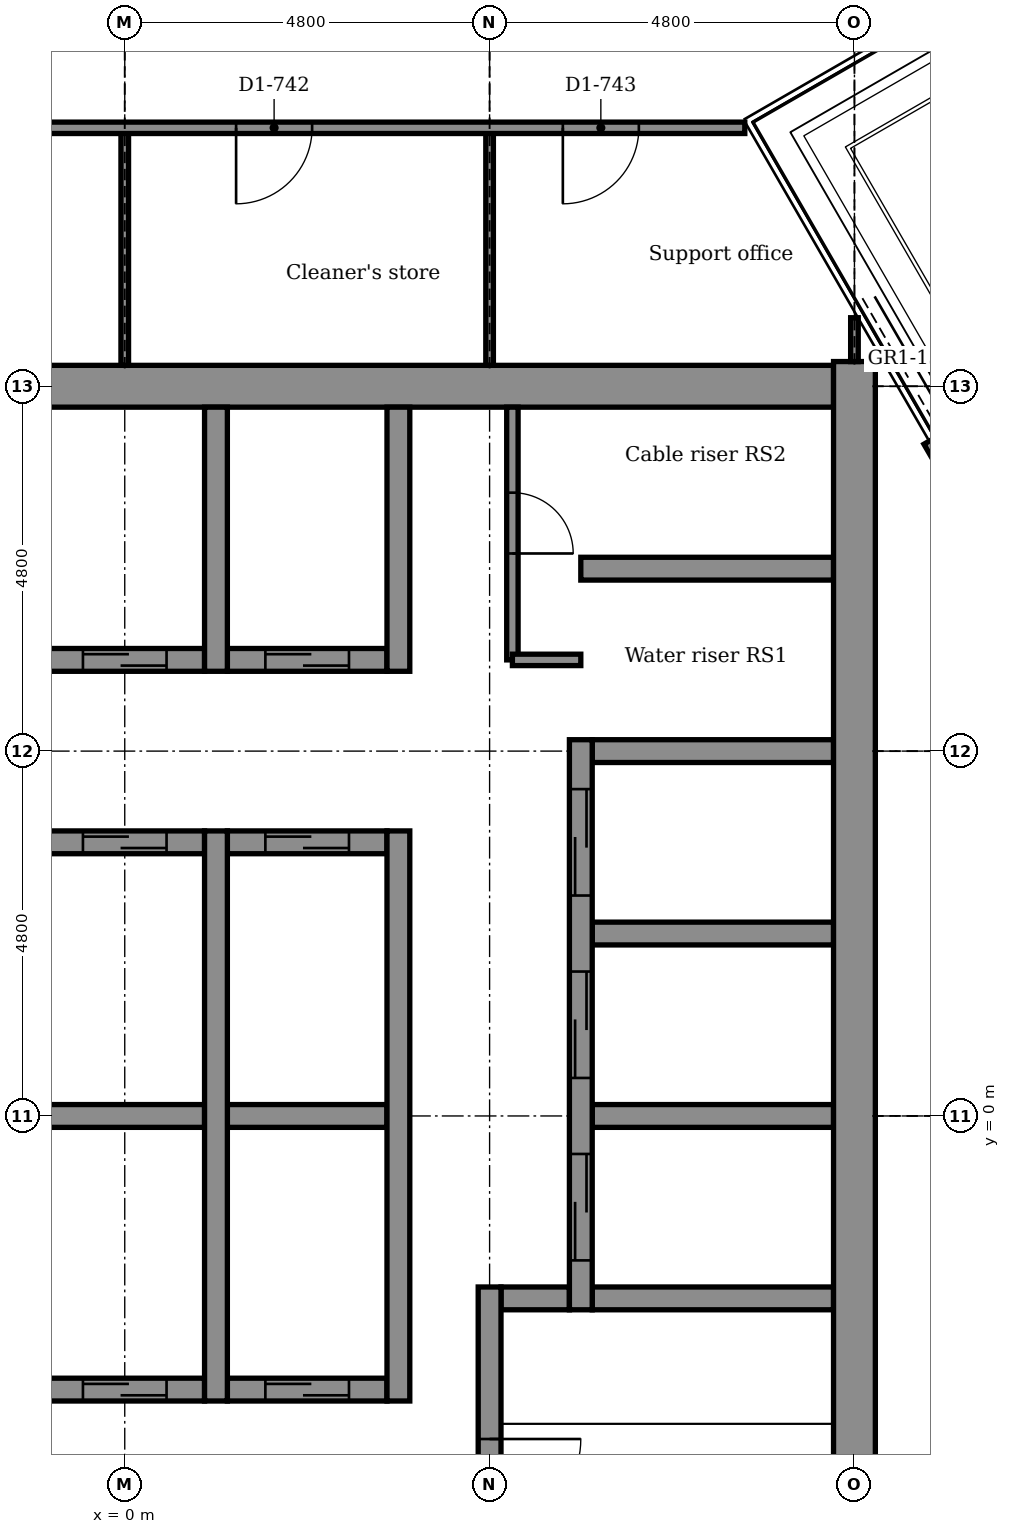
"""IFC4 building model, lengths in metres.
Left out: names, types, materials, properties, quantities, classifications, styles, units other than length and angle.
Written with IfcOpenShell. Run it as: python <this file> out.ifc"""

import sys

from ifc_helpers import new_model, si_unit, direction, frame, frame_2d, origin, place, context, subcontext, project, spatial, rectangle, extrude, element, fill, save


model = new_model("IFC4")
c1 = context("Model", 3, precision=1e-05, world=origin(), true_north=direction((0.0, 1.0)))
c2 = subcontext(c1, "Body", "Model", "MODEL_VIEW")
j1 = project(units=[si_unit("LENGTHUNIT", "METRE"), si_unit("PLANEANGLEUNIT", "RADIAN")], contexts=[c1])
p1 = place(None, origin())
s1 = spatial("IfcSite", under=j1, at=p1, CompositionType="ELEMENT")
p2 = place(p1, origin())
s2 = spatial("IfcBuilding", under=s1, at=p2, CompositionType="ELEMENT")
p3 = place(p2, frame((0.0, 0.0, 285.2)))
s3 = spatial("IfcBuildingStorey", under=s2, at=p3, CompositionType="ELEMENT", Elevation=285.2)
p4 = place(p3, frame((-1.05, -3.6, -0.15), z_axis=(0.0, 0.0, 1.0), x_axis=(1.0, 0.0, 0.0)))
e1 = element("IfcWall", 1, at=p4, inside=s3, PredefinedType="STANDARD", context=c2, shape_type="SweptSolid", body=[
    extrude(rectangle(XDim=2.1, YDim=0.3, at=frame_2d((1.05, 0.0))), origin(), (0.0, 0.0, 1.0), 3.9),
])
p5 = place(p4, frame((0.5, 0.0, 0.15)))
e2 = element("IfcOpeningElement", 2, at=p5, cuts=e1, PredefinedType="OPENING", context=c2, shape_type="SweptSolid", body=[
    extrude(rectangle(XDim=1.1, YDim=2.1, at=frame_2d((0.55, 1.05))), frame((0.0, 0.16, 0.0), z_axis=(0.0, -1.0, 0.0), x_axis=(1.0, 0.0, 0.0)), (0.0, 0.0, 1.0), 0.32),
])
p6 = place(p3, frame((1.35, -3.6, -0.15), z_axis=(0.0, 0.0, 1.0), x_axis=(1.0, 0.0, 0.0)))
e3 = element("IfcWall", 3, at=p6, inside=s3, PredefinedType="STANDARD", context=c2, shape_type="SweptSolid", body=[
    extrude(rectangle(XDim=2.1, YDim=0.3, at=frame_2d((1.05, 0.0))), origin(), (0.0, 0.0, 1.0), 3.9),
])
p7 = place(p6, frame((0.5, 0.0, 0.15)))
e4 = element("IfcOpeningElement", 4, at=p7, cuts=e3, PredefinedType="OPENING", context=c2, shape_type="SweptSolid", body=[
    extrude(rectangle(XDim=1.1, YDim=2.1, at=frame_2d((0.55, 1.05))), frame((0.0, 0.16, 0.0), z_axis=(0.0, -1.0, 0.0), x_axis=(1.0, 0.0, 0.0)), (0.0, 0.0, 1.0), 0.32),
])
p8 = place(p3, frame((4.95, -2.4, -0.15), z_axis=(0.0, 0.0, 1.0), x_axis=(1.0, 0.0, 0.0)))
e5 = element("IfcWall", 5, at=p8, inside=s3, PredefinedType="STANDARD", context=c2, shape_type="SweptSolid", body=[
    extrude(rectangle(XDim=0.9, YDim=0.3, at=frame_2d((0.45, 0.0))), origin(), (0.0, 0.0, 1.0), 3.9),
])
p9 = place(p3, frame((6.15, -2.4, -0.15), z_axis=(0.0, 0.0, 1.0), x_axis=(1.0, 0.0, 0.0)))
e6 = element("IfcWall", 6, at=p9, inside=s3, PredefinedType="STANDARD", context=c2, shape_type="SweptSolid", body=[
    extrude(rectangle(XDim=3.175, YDim=0.3, at=frame_2d((1.587, 0.0))), origin(), (0.0, 0.0, 1.0), 3.9),
])
p10 = place(p3, frame((-1.05, 0.0, -0.15), z_axis=(0.0, 0.0, 1.0), x_axis=(1.0, 0.0, 0.0)))
e7 = element("IfcWall", 7, at=p10, inside=s3, PredefinedType="STANDARD", context=c2, shape_type="SweptSolid", body=[
    extrude(rectangle(XDim=2.1, YDim=0.3, at=frame_2d((1.05, 0.0))), origin(), (0.0, 0.0, 1.0), 3.9),
])
p11 = place(p3, frame((1.35, 0.0, -0.15), z_axis=(0.0, 0.0, 1.0), x_axis=(1.0, 0.0, 0.0)))
e8 = element("IfcWall", 8, at=p11, inside=s3, PredefinedType="STANDARD", context=c2, shape_type="SweptSolid", body=[
    extrude(rectangle(XDim=2.1, YDim=0.3, at=frame_2d((1.05, 0.0))), origin(), (0.0, 0.0, 1.0), 3.9),
])
for number, where, z_axis, x_axis in (
    (9, (6.15, 0.0, -0.15), (0.0, 0.0, 1.0), (1.0, 0.0, 0.0)),
    (10, (6.15, 2.4, -0.15), (0.0, 0.0, 1.0), (1.0, 0.0, 0.0)),
):
    element("IfcWall", number, at=place(p3, frame(where, z_axis=z_axis, x_axis=x_axis)), inside=s3, PredefinedType="STANDARD", context=c2, shape_type="SweptSolid", body=[
        extrude(rectangle(XDim=3.175, YDim=0.3, at=frame_2d((1.587, 0.0))), origin(), (0.0, 0.0, 1.0), 3.9),
    ])
p12 = place(p3, frame((-1.05, 3.6, -0.15), z_axis=(0.0, 0.0, 1.0), x_axis=(1.0, 0.0, 0.0)))
e11 = element("IfcWall", 11, at=p12, inside=s3, PredefinedType="STANDARD", context=c2, shape_type="SweptSolid", body=[
    extrude(rectangle(XDim=2.1, YDim=0.3, at=frame_2d((1.05, 0.0))), origin(), (0.0, 0.0, 1.0), 3.9),
])
p13 = place(p12, frame((0.5, 0.0, 0.15)))
e12 = element("IfcOpeningElement", 12, at=p13, cuts=e11, PredefinedType="OPENING", context=c2, shape_type="SweptSolid", body=[
    extrude(rectangle(XDim=1.1, YDim=2.1, at=frame_2d((0.55, 1.05))), frame((0.0, 0.16, 0.0), z_axis=(0.0, -1.0, 0.0), x_axis=(1.0, 0.0, 0.0)), (0.0, 0.0, 1.0), 0.32),
])
p14 = place(p3, frame((1.35, 3.6, -0.15), z_axis=(0.0, 0.0, 1.0), x_axis=(1.0, 0.0, 0.0)))
e13 = element("IfcWall", 13, at=p14, inside=s3, PredefinedType="STANDARD", context=c2, shape_type="SweptSolid", body=[
    extrude(rectangle(XDim=2.1, YDim=0.3, at=frame_2d((1.05, 0.0))), origin(), (0.0, 0.0, 1.0), 3.9),
])
p15 = place(p14, frame((0.5, 0.0, 0.15)))
e14 = element("IfcOpeningElement", 14, at=p15, cuts=e13, PredefinedType="OPENING", context=c2, shape_type="SweptSolid", body=[
    extrude(rectangle(XDim=1.1, YDim=2.1, at=frame_2d((0.55, 1.05))), frame((0.0, 0.16, 0.0), z_axis=(0.0, -1.0, 0.0), x_axis=(1.0, 0.0, 0.0)), (0.0, 0.0, 1.0), 0.32),
])
p16 = place(p3, frame((6.15, 4.8, -0.15), z_axis=(0.0, 0.0, 1.0), x_axis=(1.0, 0.0, 0.0)))
e15 = element("IfcWall", 15, at=p16, inside=s3, PredefinedType="STANDARD", context=c2, shape_type="SweptSolid", body=[
    extrude(rectangle(XDim=3.175, YDim=0.3, at=frame_2d((1.587, 0.0))), origin(), (0.0, 0.0, 1.0), 3.9),
])
p17 = place(p3, frame((-1.05, 6.0, -0.15), z_axis=(0.0, 0.0, 1.0), x_axis=(1.0, 0.0, 0.0)))
e16 = element("IfcWall", 16, at=p17, inside=s3, PredefinedType="STANDARD", context=c2, shape_type="SweptSolid", body=[
    extrude(rectangle(XDim=2.1, YDim=0.3, at=frame_2d((1.05, 0.0))), origin(), (0.0, 0.0, 1.0), 3.9),
])
p18 = place(p17, frame((0.5, 0.0, 0.15)))
e17 = element("IfcOpeningElement", 17, at=p18, cuts=e16, PredefinedType="OPENING", context=c2, shape_type="SweptSolid", body=[
    extrude(rectangle(XDim=1.1, YDim=2.1, at=frame_2d((0.55, 1.05))), frame((0.0, 0.16, 0.0), z_axis=(0.0, -1.0, 0.0), x_axis=(1.0, 0.0, 0.0)), (0.0, 0.0, 1.0), 0.32),
])
p19 = place(p3, frame((1.35, 6.0, -0.15), z_axis=(0.0, 0.0, 1.0), x_axis=(1.0, 0.0, 0.0)))
e18 = element("IfcWall", 18, at=p19, inside=s3, PredefinedType="STANDARD", context=c2, shape_type="SweptSolid", body=[
    extrude(rectangle(XDim=2.1, YDim=0.3, at=frame_2d((1.05, 0.0))), origin(), (0.0, 0.0, 1.0), 3.9),
])
p20 = place(p19, frame((0.5, 0.0, 0.15)))
e19 = element("IfcOpeningElement", 19, at=p20, cuts=e18, PredefinedType="OPENING", context=c2, shape_type="SweptSolid", body=[
    extrude(rectangle(XDim=1.1, YDim=2.1, at=frame_2d((0.55, 1.05))), frame((0.0, 0.16, 0.0), z_axis=(0.0, -1.0, 0.0), x_axis=(1.0, 0.0, 0.0)), (0.0, 0.0, 1.0), 0.32),
])
p21 = place(p3, frame((6.0, 7.2, -0.15), z_axis=(0.0, 0.0, 1.0), x_axis=(1.0, 0.0, 0.0)))
e20 = element("IfcWall", 20, at=p21, inside=s3, PredefinedType="STANDARD", context=c2, shape_type="SweptSolid", body=[
    extrude(rectangle(XDim=3.325, YDim=0.3, at=frame_2d((1.663, 0.0))), origin(), (0.0, 0.0, 1.0), 3.9),
])
p22 = place(p3, frame((-5.25, 9.6, -0.15), z_axis=(0.0, 0.0, 1.0), x_axis=(1.0, 0.0, 0.0)))
e21 = element("IfcWall", 21, at=p22, inside=s3, PredefinedType="SHEAR", context=c2, shape_type="SweptSolid", body=[
    extrude(rectangle(XDim=14.575, YDim=0.55, at=frame_2d((7.288, 0.0))), origin(), (0.0, 0.0, 1.0), 3.9),
])
p23 = place(p22, frame((0.6, 0.0, 0.15)))
e22 = element("IfcOpeningElement", 22, at=p23, cuts=e21, PredefinedType="OPENING", context=c2, shape_type="SweptSolid", body=[
    extrude(rectangle(XDim=0.9, YDim=2.1, at=frame_2d((0.45, 1.05))), frame((0.0, 0.285, 0.0), z_axis=(0.0, -1.0, 0.0), x_axis=(1.0, 0.0, 0.0)), (0.0, 0.0, 1.0), 0.57),
])
p24 = place(p3, frame((1.2, -3.75, -0.15), z_axis=(0.0, 0.0, 1.0), x_axis=(0.0, 1.0, 0.0)))
e23 = element("IfcWall", 23, at=p24, inside=s3, PredefinedType="STANDARD", context=c2, shape_type="SweptSolid", body=[
    extrude(rectangle(XDim=7.5, YDim=0.3, at=frame_2d((3.75, 0.0))), origin(), (0.0, 0.0, 1.0), 3.9),
])
p25 = place(p3, frame((1.2, 5.85, -0.15), z_axis=(0.0, 0.0, 1.0), x_axis=(0.0, 1.0, 0.0)))
e24 = element("IfcWall", 24, at=p25, inside=s3, PredefinedType="STANDARD", context=c2, shape_type="SweptSolid", body=[
    extrude(rectangle(XDim=3.475, YDim=0.3, at=frame_2d((1.737, 0.0))), origin(), (0.0, 0.0, 1.0), 3.9),
])
p26 = place(p3, frame((3.6, -3.75, -0.15), z_axis=(0.0, 0.0, 1.0), x_axis=(0.0, 1.0, 0.0)))
e25 = element("IfcWall", 25, at=p26, inside=s3, PredefinedType="STANDARD", context=c2, shape_type="SweptSolid", body=[
    extrude(rectangle(XDim=7.5, YDim=0.3, at=frame_2d((3.75, 0.0))), origin(), (0.0, 0.0, 1.0), 3.9),
])
p27 = place(p3, frame((3.6, 5.85, -0.15), z_axis=(0.0, 0.0, 1.0), x_axis=(0.0, 1.0, 0.0)))
e26 = element("IfcWall", 26, at=p27, inside=s3, PredefinedType="STANDARD", context=c2, shape_type="SweptSolid", body=[
    extrude(rectangle(XDim=3.475, YDim=0.3, at=frame_2d((1.737, 0.0))), origin(), (0.0, 0.0, 1.0), 3.9),
])
p28 = place(p3, frame((4.8, -9.325, -0.15), z_axis=(0.0, 0.0, 1.0), x_axis=(0.0, 1.0, 0.0)))
e27 = element("IfcWall", 27, at=p28, inside=s3, PredefinedType="STANDARD", context=c2, shape_type="SweptSolid", body=[
    extrude(rectangle(XDim=7.075, YDim=0.3, at=frame_2d((3.538, 0.0))), origin(), (0.0, 0.0, 1.0), 3.9),
])
p29 = place(p28, frame((3.875, 0.0, 0.15)))
e28 = element("IfcOpeningElement", 28, at=p29, cuts=e27, PredefinedType="OPENING", context=c2, shape_type="SweptSolid", body=[
    extrude(rectangle(XDim=1.2, YDim=2.1, at=frame_2d((0.6, 1.05))), frame((0.0, 0.16, 0.0), z_axis=(0.0, -1.0, 0.0), x_axis=(1.0, 0.0, 0.0)), (0.0, 0.0, 1.0), 0.32),
])
p30 = place(p3, frame((6.0, -2.55, -0.15), z_axis=(0.0, 0.0, 1.0), x_axis=(0.0, 1.0, 0.0)))
e29 = element("IfcWall", 29, at=p30, inside=s3, PredefinedType="STANDARD", context=c2, shape_type="SweptSolid", body=[
    extrude(rectangle(XDim=7.5, YDim=0.3, at=frame_2d((3.75, 0.0))), origin(), (0.0, 0.0, 1.0), 3.9),
])
p31 = place(p30, frame((0.65, 0.0, 0.15)))
e30 = element("IfcOpeningElement", 30, at=p31, cuts=e29, PredefinedType="OPENING", context=c2, shape_type="SweptSolid", body=[
    extrude(rectangle(XDim=1.4, YDim=2.1, at=frame_2d((0.7, 1.05))), frame((0.0, 0.16, 0.0), z_axis=(0.0, -1.0, 0.0), x_axis=(1.0, 0.0, 0.0)), (0.0, 0.0, 1.0), 0.32),
])
p32 = place(p30, frame((3.05, 0.0, 0.15)))
e31 = element("IfcOpeningElement", 31, at=p32, cuts=e29, PredefinedType="OPENING", context=c2, shape_type="SweptSolid", body=[
    extrude(rectangle(XDim=1.4, YDim=2.1, at=frame_2d((0.7, 1.05))), frame((0.0, 0.16, 0.0), z_axis=(0.0, -1.0, 0.0), x_axis=(1.0, 0.0, 0.0)), (0.0, 0.0, 1.0), 0.32),
])
p33 = place(p30, frame((5.45, 0.0, 0.15)))
e32 = element("IfcOpeningElement", 32, at=p33, cuts=e29, PredefinedType="OPENING", context=c2, shape_type="SweptSolid", body=[
    extrude(rectangle(XDim=1.4, YDim=2.1, at=frame_2d((0.7, 1.05))), frame((0.0, 0.16, 0.0), z_axis=(0.0, -1.0, 0.0), x_axis=(1.0, 0.0, 0.0)), (0.0, 0.0, 1.0), 0.32),
])
p34 = place(p3, frame((9.6, -10.15, -0.15), z_axis=(0.0, 0.0, 1.0), x_axis=(0.0, 1.0, 0.0)))
e33 = element("IfcWall", 33, at=p34, inside=s3, PredefinedType="SHEAR", context=c2, shape_type="SweptSolid", body=[
    extrude(rectangle(XDim=20.075, YDim=0.55, at=frame_2d((10.038, 0.0))), origin(), (0.0, 0.0, 1.0), 3.9),
])
p35 = place(p3, frame((10.583, 8.878, 0.0), z_axis=(0.0, 0.0, 1.0), x_axis=(0.500011970786, -0.866018492338, 0.0)))
e34 = element("IfcWall", 34, at=p35, inside=s3, PredefinedType="PARTITIONING", context=c2, shape_type="SweptSolid", body=[
    extrude(rectangle(XDim=4.793, YDim=0.16, at=frame_2d((2.397, 0.0))), origin(), (0.0, 0.0, 1.0), 3.75),
])
p36 = place(p35, frame((1.197, 0.0, 0.0)))
e35 = element("IfcOpeningElement", 35, at=p36, cuts=e34, PredefinedType="OPENING", context=c2, shape_type="SweptSolid", body=[
    extrude(rectangle(XDim=2.4, YDim=2.4, at=frame_2d((1.2, 1.2))), frame((0.0, 0.09, 0.0), z_axis=(0.0, -1.0, 0.0), x_axis=(1.0, 0.0, 0.0)), (0.0, 0.0, 1.0), 0.18),
])
p37 = place(p3, frame((9.6, 9.925, 0.0), z_axis=(0.0, 0.0, 1.0), x_axis=(0.0, 1.0, 0.0)))
e36 = element("IfcWall", 36, at=p37, inside=s3, PredefinedType="PARTITIONING", context=c2, shape_type="SweptSolid", body=[
    extrude(rectangle(XDim=0.576, YDim=0.1, at=frame_2d((0.288, 0.0))), origin(), (0.0, 0.0, 1.0), 3.217),
])
p38 = place(p3, frame((5.1, 6.0, 0.0), z_axis=(0.0, 0.0, 1.0), x_axis=(0.0, 1.0, 0.0)))
e37 = element("IfcWall", 37, at=p38, inside=s3, PredefinedType="PARTITIONING", context=c2, shape_type="SweptSolid", body=[
    extrude(rectangle(XDim=3.325, YDim=0.15, at=frame_2d((1.663, 0.0))), origin(), (0.0, 0.0, 1.0), 3.75),
])
p39 = place(p38, frame((1.4, 0.0, 0.0)))
e38 = element("IfcOpeningElement", 38, at=p39, cuts=e37, PredefinedType="OPENING", context=c2, shape_type="SweptSolid", body=[
    extrude(rectangle(XDim=0.8, YDim=2.1, at=frame_2d((0.4, 1.05))), frame((0.0, 0.085, 0.0), z_axis=(0.0, -1.0, 0.0), x_axis=(1.0, 0.0, 0.0)), (0.0, 0.0, 1.0), 0.17),
])
for number, where, z_axis, x_axis in (
    (39, (4.8, 9.875, 0.0), (0.0, 0.0, 1.0), (0.0, 1.0, 0.0)),
    (40, (0.0, 9.875, 0.0), (0.0, 0.0, 1.0), (0.0, 1.0, 0.0)),
):
    element("IfcWall", number, at=place(p3, frame(where, z_axis=z_axis, x_axis=x_axis)), inside=s3, PredefinedType="PARTITIONING", context=c2, shape_type="SweptSolid", body=[
        extrude(rectangle(XDim=3.125, YDim=0.1, at=frame_2d((1.562, 0.0))), origin(), (0.0, 0.0, 1.0), 3.217),
    ])
p40 = place(p3, frame((5.1, 6.0, 0.0), z_axis=(0.0, 0.0, 1.0), x_axis=(1.0, 0.0, 0.0)))
e41 = element("IfcWall", 41, at=p40, inside=s3, PredefinedType="PARTITIONING", context=c2, shape_type="SweptSolid", body=[
    extrude(rectangle(XDim=0.9, YDim=0.15, at=frame_2d((0.45, 0.0))), origin(), (0.0, 0.0, 1.0), 3.75),
])
p41 = place(p3, frame((-3.0, 13.0, 0.0), z_axis=(0.0, 0.0, 1.0), x_axis=(1.0, 0.0, 0.0)))
e42 = element("IfcWall", 42, at=p41, inside=s3, PredefinedType="PARTITIONING", context=c2, shape_type="SweptSolid", body=[
    extrude(rectangle(XDim=11.157, YDim=0.15, at=frame_2d((5.579, 0.0))), origin(), (0.0, 0.0, 1.0), 3.75),
])
p42 = place(p41, frame((1.0, 0.0, 0.0)))
e43 = element("IfcOpeningElement", 43, at=p42, cuts=e42, PredefinedType="OPENING", context=c2, shape_type="SweptSolid", body=[
    extrude(rectangle(XDim=1.0, YDim=2.1, at=frame_2d((0.5, 1.05))), frame((0.0, 0.085, 0.0), z_axis=(0.0, -1.0, 0.0), x_axis=(1.0, 0.0, 0.0)), (0.0, 0.0, 1.0), 0.17),
])
p43 = place(p41, frame((4.465, 0.0, 0.0)))
e44 = element("IfcOpeningElement", 44, at=p43, cuts=e42, PredefinedType="OPENING", context=c2, shape_type="SweptSolid", body=[
    extrude(rectangle(XDim=1.0, YDim=2.1, at=frame_2d((0.5, 1.05))), frame((0.0, 0.085, 0.0), z_axis=(0.0, -1.0, 0.0), x_axis=(1.0, 0.0, 0.0)), (0.0, 0.0, 1.0), 0.17),
])
p44 = place(p41, frame((8.764, 0.0, 0.0)))
e45 = element("IfcOpeningElement", 45, at=p44, cuts=e42, PredefinedType="OPENING", context=c2, shape_type="SweptSolid", body=[
    extrude(rectangle(XDim=1.0, YDim=2.1, at=frame_2d((0.5, 1.05))), frame((0.0, 0.085, 0.0), z_axis=(0.0, -1.0, 0.0), x_axis=(1.0, 0.0, 0.0)), (0.0, 0.0, 1.0), 0.17),
])
p45 = place(p39, frame((0.8, 0.0, 0.0), z_axis=(0.0, 0.0, 1.0), x_axis=(-1.0, 0.0, 0.0)))
e46 = element("IfcDoor", 46, at=p45, inside=s3, OperationType="SINGLE_SWING_LEFT", PredefinedType="DOOR", context=c2, shape_type="SweptSolid", body=[
    extrude(rectangle(XDim=0.8, YDim=2.1, at=frame_2d((0.4, 1.05))), frame((0.0, 0.025, 0.0), z_axis=(0.0, -1.0, 0.0), x_axis=(1.0, 0.0, 0.0)), (0.0, 0.0, 1.0), 0.05),
])
fill(e38, e46)
p46 = place(p43, frame((1.0, 0.0, 0.0), z_axis=(0.0, 0.0, 1.0), x_axis=(-1.0, 0.0, 0.0)))
e47 = element("IfcDoor", 47, at=p46, inside=s3, OperationType="SINGLE_SWING_LEFT", PredefinedType="DOOR", context=c2, shape_type="SweptSolid", body=[
    extrude(rectangle(XDim=1.0, YDim=2.1, at=frame_2d((0.5, 1.05))), frame((0.0, 0.025, 0.0), z_axis=(0.0, -1.0, 0.0), x_axis=(1.0, 0.0, 0.0)), (0.0, 0.0, 1.0), 0.05),
])
fill(e44, e47)
p47 = place(p44, frame((1.0, 0.0, 0.0), z_axis=(0.0, 0.0, 1.0), x_axis=(-1.0, 0.0, 0.0)))
e48 = element("IfcDoor", 48, at=p47, inside=s3, OperationType="SINGLE_SWING_LEFT", PredefinedType="DOOR", context=c2, shape_type="SweptSolid", body=[
    extrude(rectangle(XDim=1.0, YDim=2.1, at=frame_2d((0.5, 1.05))), frame((0.0, 0.025, 0.0), z_axis=(0.0, -1.0, 0.0), x_axis=(1.0, 0.0, 0.0)), (0.0, 0.0, 1.0), 0.05),
])
fill(e45, e48)
p48 = place(p31, origin())
e49 = element("IfcDoor", 49, at=p48, inside=s3, OperationType="DOUBLE_DOOR_SLIDING", PredefinedType="DOOR", context=c2, shape_type="SweptSolid", body=[
    extrude(rectangle(XDim=1.4, YDim=2.1, at=frame_2d((0.7, 1.05))), frame((0.0, 0.025, 0.0), z_axis=(0.0, -1.0, 0.0), x_axis=(1.0, 0.0, 0.0)), (0.0, 0.0, 1.0), 0.05),
])
fill(e30, e49)
p49 = place(p32, origin())
e50 = element("IfcDoor", 50, at=p49, inside=s3, OperationType="DOUBLE_DOOR_SLIDING", PredefinedType="DOOR", context=c2, shape_type="SweptSolid", body=[
    extrude(rectangle(XDim=1.4, YDim=2.1, at=frame_2d((0.7, 1.05))), frame((0.0, 0.025, 0.0), z_axis=(0.0, -1.0, 0.0), x_axis=(1.0, 0.0, 0.0)), (0.0, 0.0, 1.0), 0.05),
])
fill(e31, e50)
p50 = place(p33, origin())
e51 = element("IfcDoor", 51, at=p50, inside=s3, OperationType="DOUBLE_DOOR_SLIDING", PredefinedType="DOOR", context=c2, shape_type="SweptSolid", body=[
    extrude(rectangle(XDim=1.4, YDim=2.1, at=frame_2d((0.7, 1.05))), frame((0.0, 0.025, 0.0), z_axis=(0.0, -1.0, 0.0), x_axis=(1.0, 0.0, 0.0)), (0.0, 0.0, 1.0), 0.05),
])
fill(e32, e51)
p51 = place(p18, origin())
e52 = element("IfcDoor", 52, at=p51, inside=s3, OperationType="DOUBLE_DOOR_SLIDING", PredefinedType="DOOR", context=c2, shape_type="SweptSolid", body=[
    extrude(rectangle(XDim=1.1, YDim=2.1, at=frame_2d((0.55, 1.05))), frame((0.0, 0.025, 0.0), z_axis=(0.0, -1.0, 0.0), x_axis=(1.0, 0.0, 0.0)), (0.0, 0.0, 1.0), 0.05),
])
fill(e17, e52)
p52 = place(p20, origin())
e53 = element("IfcDoor", 53, at=p52, inside=s3, OperationType="DOUBLE_DOOR_SLIDING", PredefinedType="DOOR", context=c2, shape_type="SweptSolid", body=[
    extrude(rectangle(XDim=1.1, YDim=2.1, at=frame_2d((0.55, 1.05))), frame((0.0, 0.025, 0.0), z_axis=(0.0, -1.0, 0.0), x_axis=(1.0, 0.0, 0.0)), (0.0, 0.0, 1.0), 0.05),
])
fill(e19, e53)
p53 = place(p13, origin())
e54 = element("IfcDoor", 54, at=p53, inside=s3, OperationType="DOUBLE_DOOR_SLIDING", PredefinedType="DOOR", context=c2, shape_type="SweptSolid", body=[
    extrude(rectangle(XDim=1.1, YDim=2.1, at=frame_2d((0.55, 1.05))), frame((0.0, 0.025, 0.0), z_axis=(0.0, -1.0, 0.0), x_axis=(1.0, 0.0, 0.0)), (0.0, 0.0, 1.0), 0.05),
])
fill(e12, e54)
p54 = place(p15, origin())
e55 = element("IfcDoor", 55, at=p54, inside=s3, OperationType="DOUBLE_DOOR_SLIDING", PredefinedType="DOOR", context=c2, shape_type="SweptSolid", body=[
    extrude(rectangle(XDim=1.1, YDim=2.1, at=frame_2d((0.55, 1.05))), frame((0.0, 0.025, 0.0), z_axis=(0.0, -1.0, 0.0), x_axis=(1.0, 0.0, 0.0)), (0.0, 0.0, 1.0), 0.05),
])
fill(e14, e55)
p55 = place(p5, origin())
e56 = element("IfcDoor", 56, at=p55, inside=s3, OperationType="DOUBLE_DOOR_SLIDING", PredefinedType="DOOR", context=c2, shape_type="SweptSolid", body=[
    extrude(rectangle(XDim=1.1, YDim=2.1, at=frame_2d((0.55, 1.05))), frame((0.0, 0.025, 0.0), z_axis=(0.0, -1.0, 0.0), x_axis=(1.0, 0.0, 0.0)), (0.0, 0.0, 1.0), 0.05),
])
fill(e2, e56)
p56 = place(p7, origin())
e57 = element("IfcDoor", 57, at=p56, inside=s3, OperationType="DOUBLE_DOOR_SLIDING", PredefinedType="DOOR", context=c2, shape_type="SweptSolid", body=[
    extrude(rectangle(XDim=1.1, YDim=2.1, at=frame_2d((0.55, 1.05))), frame((0.0, 0.025, 0.0), z_axis=(0.0, -1.0, 0.0), x_axis=(1.0, 0.0, 0.0)), (0.0, 0.0, 1.0), 0.05),
])
fill(e4, e57)
p57 = place(p29, frame((1.2, 0.0, 0.0), z_axis=(0.0, 0.0, 1.0), x_axis=(-1.0, 0.0, 0.0)))
e58 = element("IfcDoor", 58, at=p57, inside=s3, OperationType="SINGLE_SWING_RIGHT", PredefinedType="DOOR", context=c2, shape_type="SweptSolid", body=[
    extrude(rectangle(XDim=1.2, YDim=2.1, at=frame_2d((0.6, 1.05))), frame((0.0, 0.025, 0.0), z_axis=(0.0, -1.0, 0.0), x_axis=(1.0, 0.0, 0.0)), (0.0, 0.0, 1.0), 0.05),
])
fill(e28, e58)
save(model, sys.argv[1])
